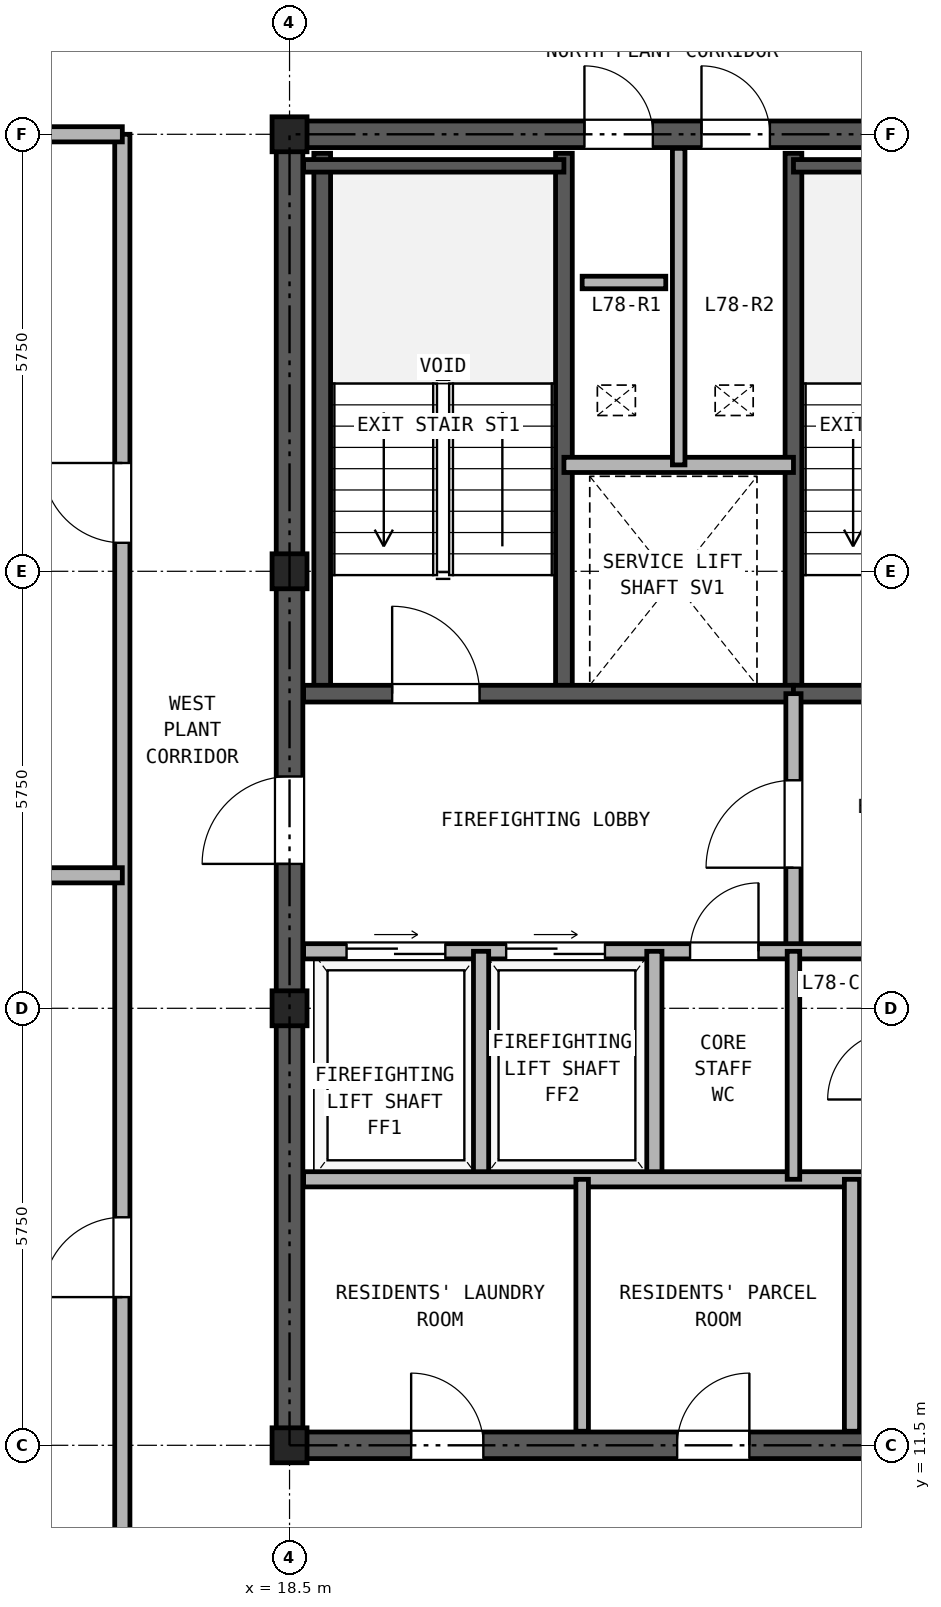
"""IFC4 building model, lengths in metres.
Left out: names, types, materials, properties, quantities, classifications, styles, units other than length and angle.
Written with IfcOpenShell. Run it as: python <this file> out.ifc"""

import sys

from ifc_helpers import new_model, si_unit, direction, frame, frame_2d, origin, origin_2d, place, context, subcontext, project, spatial, rectangle, hollow_rectangle, extrude, source, transform, mapped, element, fill, save


model = new_model("IFC4")
c1 = context("Model", 3, precision=1e-05, world=origin(), true_north=direction((0.0, 1.0)))
c2 = subcontext(c1, "Body", "Model", "MODEL_VIEW")
j1 = project(units=[si_unit("LENGTHUNIT", "METRE"), si_unit("PLANEANGLEUNIT", "RADIAN")], contexts=[c1])
p1 = place(None, origin())
s1 = spatial("IfcSite", under=j1, at=p1, CompositionType="ELEMENT")
p2 = place(p1, origin())
s2 = spatial("IfcBuilding", under=s1, at=p2, CompositionType="ELEMENT")
p3 = place(p2, frame((0.0, 0.0, 271.3)))
s3 = spatial("IfcBuildingStorey", under=s2, at=p3, CompositionType="ELEMENT", Elevation=271.3)
m1 = source(origin(), c2, "Body", "SweptSolid", [
    extrude(hollow_rectangle(XDim=0.46, YDim=0.46, WallThickness=0.025, at=origin_2d()), origin(), (0.0, 0.0, 1.0), 3.38),
])
for number, where, z_axis, x_axis in (
    (1, (18.5, 11.5, 0.0), (0.0, 0.0, 1.0), (1.0, 0.0, 0.0)),
    (2, (18.5, 17.25, 0.0), (0.0, 0.0, 1.0), (1.0, 0.0, 0.0)),
    (3, (18.5, 23.0, 0.0), (0.0, 0.0, 1.0), (1.0, 0.0, 0.0)),
    (4, (18.5, 28.75, 0.0), (0.0, 0.0, 1.0), (1.0, 0.0, 0.0)),
):
    element("IfcColumn", number, at=place(p3, frame(where, z_axis=z_axis, x_axis=x_axis)), inside=s3, PredefinedType="COLUMN", context=c2, shape_type="MappedRepresentation", body=[
        mapped(m1, transform((0.0, 0.0, 0.0), x_axis=(1.0, 0.0, 0.0), y_axis=(0.0, 1.0, 0.0), z_axis=(0.0, 0.0, 1.0), scale=1.0)),
    ])
p4 = place(p3, frame((18.325, 11.5, 0.0), z_axis=(0.0, 0.0, 1.0), x_axis=(1.0, 0.0, 0.0)))
e5 = element("IfcWall", 5, at=p4, inside=s3, PredefinedType="SHEAR", context=c2, shape_type="SweptSolid", body=[
    extrude(rectangle(XDim=10.35, YDim=0.35, at=frame_2d((5.175, 0.0))), origin(), (0.0, 0.0, 1.0), 3.38),
])
p5 = place(p4, frame((1.775, 0.0, 0.0)))
e6 = element("IfcOpeningElement", 6, at=p5, cuts=e5, PredefinedType="OPENING", context=c2, shape_type="SweptSolid", body=[
    extrude(rectangle(XDim=0.95, YDim=2.15, at=frame_2d((0.475, 1.075))), frame((0.0, 0.185, 0.0), z_axis=(0.0, -1.0, 0.0), x_axis=(1.0, 0.0, 0.0)), (0.0, 0.0, 1.0), 0.37),
])
p6 = place(p4, frame((5.275, 0.0, 0.0)))
e7 = element("IfcOpeningElement", 7, at=p6, cuts=e5, PredefinedType="OPENING", context=c2, shape_type="SweptSolid", body=[
    extrude(rectangle(XDim=0.95, YDim=2.15, at=frame_2d((0.475, 1.075))), frame((0.0, 0.185, 0.0), z_axis=(0.0, -1.0, 0.0), x_axis=(1.0, 0.0, 0.0)), (0.0, 0.0, 1.0), 0.37),
])
p7 = place(p3, frame((18.325, 28.75, 0.0), z_axis=(0.0, 0.0, 1.0), x_axis=(1.0, 0.0, 0.0)))
e8 = element("IfcWall", 8, at=p7, inside=s3, PredefinedType="SHEAR", context=c2, shape_type="SweptSolid", body=[
    extrude(rectangle(XDim=10.35, YDim=0.35, at=frame_2d((5.175, 0.0))), origin(), (0.0, 0.0, 1.0), 3.38),
])
p8 = place(p7, frame((4.055, 0.0, 0.0)))
e9 = element("IfcOpeningElement", 9, at=p8, cuts=e8, PredefinedType="OPENING", context=c2, shape_type="SweptSolid", body=[
    extrude(rectangle(XDim=0.9, YDim=2.05, at=frame_2d((0.45, 1.025))), frame((0.0, 0.185, 0.0), z_axis=(0.0, -1.0, 0.0), x_axis=(1.0, 0.0, 0.0)), (0.0, 0.0, 1.0), 0.37),
])
p9 = place(p7, frame((5.595, 0.0, 0.0)))
e10 = element("IfcOpeningElement", 10, at=p9, cuts=e8, PredefinedType="OPENING", context=c2, shape_type="SweptSolid", body=[
    extrude(rectangle(XDim=0.9, YDim=2.05, at=frame_2d((0.45, 1.025))), frame((0.0, 0.185, 0.0), z_axis=(0.0, -1.0, 0.0), x_axis=(1.0, 0.0, 0.0)), (0.0, 0.0, 1.0), 0.37),
])
p10 = place(p3, frame((18.5, 11.675, 0.0), z_axis=(0.0, 0.0, 1.0), x_axis=(0.0, 1.0, 0.0)))
e11 = element("IfcWall", 11, at=p10, inside=s3, PredefinedType="SHEAR", context=c2, shape_type="SweptSolid", body=[
    extrude(rectangle(XDim=16.9, YDim=0.35, at=frame_2d((8.45, 0.0))), origin(), (0.0, 0.0, 1.0), 3.38),
])
p11 = place(p10, frame((7.475, 0.0, 0.0)))
e12 = element("IfcOpeningElement", 12, at=p11, cuts=e11, PredefinedType="OPENING", context=c2, shape_type="SweptSolid", body=[
    extrude(rectangle(XDim=1.15, YDim=2.2, at=frame_2d((0.575, 1.1))), frame((0.0, 0.185, 0.0), z_axis=(0.0, -1.0, 0.0), x_axis=(1.0, 0.0, 0.0)), (0.0, 0.0, 1.0), 0.37),
])
for number, where, z_axis, x_axis in (
    (13, (18.93, 21.39, 0.0), (0.0, 0.0, 1.0), (0.0, 1.0, 0.0)),
    (14, (22.11, 21.39, 0.0), (0.0, 0.0, 1.0), (0.0, 1.0, 0.0)),
    (15, (25.13, 21.39, 0.0), (0.0, 0.0, 1.0), (0.0, 1.0, 0.0)),
):
    element("IfcWall", number, at=place(p3, frame(where, z_axis=z_axis, x_axis=x_axis)), inside=s3, PredefinedType="SOLIDWALL", context=c2, shape_type="SweptSolid", body=[
        extrude(rectangle(XDim=7.11, YDim=0.22, at=frame_2d((3.555, 0.0))), origin(), (0.0, 0.0, 1.0), 3.38),
    ])
p12 = place(p3, frame((18.685, 28.335, 0.0), z_axis=(0.0, 0.0, 1.0), x_axis=(1.0, 0.0, 0.0)))
e16 = element("IfcWall", 16, at=p12, inside=s3, PredefinedType="PARTITIONING", context=c2, shape_type="SweptSolid", body=[
    extrude(rectangle(XDim=3.425, YDim=0.165, at=frame_2d((1.712, 0.0))), origin(), (0.0, 0.0, 1.0), 3.38),
])
p13 = place(p3, frame((25.13, 28.335, 0.0), z_axis=(0.0, 0.0, 1.0), x_axis=(1.0, 0.0, 0.0)))
e17 = element("IfcWall", 17, at=p13, inside=s3, PredefinedType="PARTITIONING", context=c2, shape_type="SweptSolid", body=[
    extrude(rectangle(XDim=3.185, YDim=0.165, at=frame_2d((1.593, 0.0))), origin(), (0.0, 0.0, 1.0), 3.38),
])
p14 = place(p3, frame((18.685, 21.39, 0.0), z_axis=(0.0, 0.0, 1.0), x_axis=(1.0, 0.0, 0.0)))
e18 = element("IfcWall", 18, at=p14, inside=s3, PredefinedType="SOLIDWALL", context=c2, shape_type="SweptSolid", body=[
    extrude(rectangle(XDim=6.445, YDim=0.22, at=frame_2d((3.222, 0.0))), origin(), (0.0, 0.0, 1.0), 3.38),
])
p15 = place(p14, frame((1.165, 0.0, 0.0)))
e19 = element("IfcOpeningElement", 19, at=p15, cuts=e18, PredefinedType="OPENING", context=c2, shape_type="SweptSolid", body=[
    extrude(rectangle(XDim=1.15, YDim=2.2, at=frame_2d((0.575, 1.1))), frame((0.0, 0.12, 0.0), z_axis=(0.0, -1.0, 0.0), x_axis=(1.0, 0.0, 0.0)), (0.0, 0.0, 1.0), 0.24),
])
p16 = place(p3, frame((25.13, 21.39, 0.0), z_axis=(0.0, 0.0, 1.0), x_axis=(1.0, 0.0, 0.0)))
e20 = element("IfcWall", 20, at=p16, inside=s3, PredefinedType="SOLIDWALL", context=c2, shape_type="SweptSolid", body=[
    extrude(rectangle(XDim=3.185, YDim=0.22, at=frame_2d((1.593, 0.0))), origin(), (0.0, 0.0, 1.0), 3.38),
])
p17 = place(p16, frame((0.92, 0.0, 0.0)))
e21 = element("IfcOpeningElement", 21, at=p17, cuts=e20, PredefinedType="OPENING", context=c2, shape_type="SweptSolid", body=[
    extrude(rectangle(XDim=1.15, YDim=2.2, at=frame_2d((0.575, 1.1))), frame((0.0, 0.12, 0.0), z_axis=(0.0, -1.0, 0.0), x_axis=(1.0, 0.0, 0.0)), (0.0, 0.0, 1.0), 0.24),
])
p18 = place(p3, frame((22.11, 24.4, 0.0), z_axis=(0.0, 0.0, 1.0), x_axis=(1.0, 0.0, 0.0)))
e22 = element("IfcWall", 22, at=p18, inside=s3, PredefinedType="PARTITIONING", context=c2, shape_type="SweptSolid", body=[
    extrude(rectangle(XDim=3.02, YDim=0.2, at=frame_2d((1.51, 0.0))), origin(), (0.0, 0.0, 1.0), 3.38),
])
p19 = place(p3, frame((23.62, 24.4, 0.0), z_axis=(0.0, 0.0, 1.0), x_axis=(0.0, 1.0, 0.0)))
e23 = element("IfcWall", 23, at=p19, inside=s3, PredefinedType="PARTITIONING", context=c2, shape_type="SweptSolid", body=[
    extrude(rectangle(XDim=4.165, YDim=0.165, at=frame_2d((2.083, 0.0))), origin(), (0.0, 0.0, 1.0), 3.38),
])
p20 = place(p3, frame((25.13, 18.0, 0.0), z_axis=(0.0, 0.0, 1.0), x_axis=(0.0, 1.0, 0.0)))
e24 = element("IfcWall", 24, at=p20, inside=s3, PredefinedType="PARTITIONING", context=c2, shape_type="SweptSolid", body=[
    extrude(rectangle(XDim=3.39, YDim=0.2, at=frame_2d((1.695, 0.0))), origin(), (0.0, 0.0, 1.0), 3.38),
])
p21 = place(p20, frame((1.1, 0.0, 0.0)))
e25 = element("IfcOpeningElement", 25, at=p21, cuts=e24, PredefinedType="OPENING", context=c2, shape_type="SweptSolid", body=[
    extrude(rectangle(XDim=1.15, YDim=2.2, at=frame_2d((0.575, 1.1))), frame((0.0, 0.11, 0.0), z_axis=(0.0, -1.0, 0.0), x_axis=(1.0, 0.0, 0.0)), (0.0, 0.0, 1.0), 0.22),
])
p22 = place(p3, frame((18.685, 18.0, 0.0), z_axis=(0.0, 0.0, 1.0), x_axis=(1.0, 0.0, 0.0)))
e26 = element("IfcWall", 26, at=p22, inside=s3, PredefinedType="PARTITIONING", context=c2, shape_type="SweptSolid", body=[
    extrude(rectangle(XDim=9.63, YDim=0.2, at=frame_2d((4.815, 0.0))), origin(), (0.0, 0.0, 1.0), 3.38),
])
p23 = place(p22, frame((0.565, 0.0, 0.0)))
e27 = element("IfcOpeningElement", 27, at=p23, cuts=e26, PredefinedType="OPENING", context=c2, shape_type="SweptSolid", body=[
    extrude(rectangle(XDim=1.3, YDim=2.3, at=frame_2d((0.65, 1.15))), frame((0.0, 0.11, 0.0), z_axis=(0.0, -1.0, 0.0), x_axis=(1.0, 0.0, 0.0)), (0.0, 0.0, 1.0), 0.22),
])
p24 = place(p22, frame((2.665, 0.0, 0.0)))
e28 = element("IfcOpeningElement", 28, at=p24, cuts=e26, PredefinedType="OPENING", context=c2, shape_type="SweptSolid", body=[
    extrude(rectangle(XDim=1.3, YDim=2.3, at=frame_2d((0.65, 1.15))), frame((0.0, 0.11, 0.0), z_axis=(0.0, -1.0, 0.0), x_axis=(1.0, 0.0, 0.0)), (0.0, 0.0, 1.0), 0.22),
])
p25 = place(p22, frame((5.085, 0.0, 0.0)))
e29 = element("IfcOpeningElement", 29, at=p25, cuts=e26, PredefinedType="OPENING", context=c2, shape_type="SweptSolid", body=[
    extrude(rectangle(XDim=0.9, YDim=2.05, at=frame_2d((0.45, 1.025))), frame((0.0, 0.11, 0.0), z_axis=(0.0, -1.0, 0.0), x_axis=(1.0, 0.0, 0.0)), (0.0, 0.0, 1.0), 0.22),
])
p26 = place(p22, frame((8.215, 0.0, 0.0)))
e30 = element("IfcOpeningElement", 30, at=p26, cuts=e26, PredefinedType="OPENING", context=c2, shape_type="SweptSolid", body=[
    extrude(rectangle(XDim=0.9, YDim=2.05, at=frame_2d((0.45, 1.025))), frame((0.0, 0.11, 0.0), z_axis=(0.0, -1.0, 0.0), x_axis=(1.0, 0.0, 0.0)), (0.0, 0.0, 1.0), 0.22),
])
for number, where, z_axis, x_axis in (
    (31, (21.02, 15.0, 0.0), (0.0, 0.0, 1.0), (0.0, 1.0, 0.0)),
    (32, (23.3, 15.0, 0.0), (0.0, 0.0, 1.0), (0.0, 1.0, 0.0)),
):
    element("IfcWall", number, at=place(p3, frame(where, z_axis=z_axis, x_axis=x_axis)), inside=s3, PredefinedType="PARTITIONING", context=c2, shape_type="SweptSolid", body=[
        extrude(rectangle(XDim=3.0, YDim=0.2, at=frame_2d((1.5, 0.0))), origin(), (0.0, 0.0, 1.0), 3.38),
    ])
p27 = place(p3, frame((18.685, 15.0, 0.0), z_axis=(0.0, 0.0, 1.0), x_axis=(1.0, 0.0, 0.0)))
e33 = element("IfcWall", 33, at=p27, inside=s3, PredefinedType="PARTITIONING", context=c2, shape_type="SweptSolid", body=[
    extrude(rectangle(XDim=9.63, YDim=0.2, at=frame_2d((4.815, 0.0))), origin(), (0.0, 0.0, 1.0), 3.38),
])
p28 = place(p3, frame((25.13, 15.0, 0.0), z_axis=(0.0, 0.0, 1.0), x_axis=(0.0, 1.0, 0.0)))
e34 = element("IfcWall", 34, at=p28, inside=s3, PredefinedType="PARTITIONING", context=c2, shape_type="SweptSolid", body=[
    extrude(rectangle(XDim=3.0, YDim=0.165, at=frame_2d((1.5, 0.0))), origin(), (0.0, 0.0, 1.0), 3.38),
])
p29 = place(p3, frame((22.35, 11.685, 0.0), z_axis=(0.0, 0.0, 1.0), x_axis=(0.0, 1.0, 0.0)))
e35 = element("IfcWall", 35, at=p29, inside=s3, PredefinedType="PARTITIONING", context=c2, shape_type="SweptSolid", body=[
    extrude(rectangle(XDim=3.315, YDim=0.165, at=frame_2d((1.657, 0.0))), origin(), (0.0, 0.0, 1.0), 3.38),
])
p30 = place(p3, frame((25.9, 11.685, 0.0), z_axis=(0.0, 0.0, 1.0), x_axis=(0.0, 1.0, 0.0)))
e36 = element("IfcWall", 36, at=p30, inside=s3, PredefinedType="PARTITIONING", context=c2, shape_type="SweptSolid", body=[
    extrude(rectangle(XDim=3.315, YDim=0.2, at=frame_2d((1.657, 0.0))), origin(), (0.0, 0.0, 1.0), 3.38),
])
p31 = place(p3, frame((16.3, 8.9, 0.0), z_axis=(0.0, 0.0, 1.0), x_axis=(0.0, 1.0, 0.0)))
e37 = element("IfcWall", 37, at=p31, inside=s3, PredefinedType="PARTITIONING", context=c2, shape_type="SweptSolid", body=[
    extrude(rectangle(XDim=19.85, YDim=0.2, at=frame_2d((9.925, 0.0))), origin(), (0.0, 0.0, 1.0), 3.38),
])
p32 = place(p31, frame((4.55, 0.0, 0.0)))
e38 = element("IfcOpeningElement", 38, at=p32, cuts=e37, PredefinedType="OPENING", context=c2, shape_type="SweptSolid", body=[
    extrude(rectangle(XDim=1.05, YDim=2.15, at=frame_2d((0.525, 1.075))), frame((0.0, 0.11, 0.0), z_axis=(0.0, -1.0, 0.0), x_axis=(1.0, 0.0, 0.0)), (0.0, 0.0, 1.0), 0.22),
])
p33 = place(p31, frame((14.475, 0.0, 0.0)))
e39 = element("IfcOpeningElement", 39, at=p33, cuts=e37, PredefinedType="OPENING", context=c2, shape_type="SweptSolid", body=[
    extrude(rectangle(XDim=1.05, YDim=2.15, at=frame_2d((0.525, 1.075))), frame((0.0, 0.11, 0.0), z_axis=(0.0, -1.0, 0.0), x_axis=(1.0, 0.0, 0.0)), (0.0, 0.0, 1.0), 0.22),
])
p34 = place(p3, frame((5.45, 28.75, 0.0), z_axis=(0.0, 0.0, 1.0), x_axis=(1.0, 0.0, 0.0)))
e40 = element("IfcWall", 40, at=p34, inside=s3, PredefinedType="PARTITIONING", context=c2, shape_type="SweptSolid", body=[
    extrude(rectangle(XDim=10.85, YDim=0.2, at=frame_2d((5.425, 0.0))), origin(), (0.0, 0.0, 1.0), 2.905),
])
p35 = place(p3, frame((5.45, 19.0, 0.0), z_axis=(0.0, 0.0, 1.0), x_axis=(1.0, 0.0, 0.0)))
e41 = element("IfcWall", 41, at=p35, inside=s3, PredefinedType="PARTITIONING", context=c2, shape_type="SweptSolid", body=[
    extrude(rectangle(XDim=10.85, YDim=0.2, at=frame_2d((5.425, 0.0))), origin(), (0.0, 0.0, 1.0), 3.38),
])
p36 = place(p3, frame((22.35, 26.8, 0.0), z_axis=(0.0, 0.0, 1.0), x_axis=(1.0, 0.0, 0.0)))
e42 = element("IfcWall", 42, at=p36, inside=s3, PredefinedType="PARTITIONING", context=c2, shape_type="SweptSolid", body=[
    extrude(rectangle(XDim=1.1, YDim=0.165, at=frame_2d((0.55, 0.0))), origin(), (0.0, 0.0, 1.0), 3.38),
])
p37 = place(p15, frame((1.15, 0.0, 0.0), z_axis=(0.0, 0.0, 1.0), x_axis=(-1.0, 0.0, 0.0)))
e43 = element("IfcDoor", 43, at=p37, inside=s3, OperationType="SINGLE_SWING_LEFT", PredefinedType="DOOR", context=c2, shape_type="SweptSolid", body=[
    extrude(rectangle(XDim=1.15, YDim=2.2, at=frame_2d((0.575, 1.1))), frame((0.0, 0.025, 0.0), z_axis=(0.0, -1.0, 0.0), x_axis=(1.0, 0.0, 0.0)), (0.0, 0.0, 1.0), 0.05),
])
fill(e19, e43)
p38 = place(p21, origin())
e44 = element("IfcDoor", 44, at=p38, inside=s3, OperationType="SINGLE_SWING_LEFT", PredefinedType="DOOR", context=c2, shape_type="SweptSolid", body=[
    extrude(rectangle(XDim=1.15, YDim=2.2, at=frame_2d((0.575, 1.1))), frame((0.0, 0.025, 0.0), z_axis=(0.0, -1.0, 0.0), x_axis=(1.0, 0.0, 0.0)), (0.0, 0.0, 1.0), 0.05),
])
fill(e25, e44)
p39 = place(p23, origin())
e45 = element("IfcDoor", 45, at=p39, inside=s3, OperationType="DOUBLE_DOOR_SLIDING", PredefinedType="DOOR", context=c2, shape_type="SweptSolid", body=[
    extrude(rectangle(XDim=1.3, YDim=2.3, at=frame_2d((0.65, 1.15))), frame((0.0, 0.025, 0.0), z_axis=(0.0, -1.0, 0.0), x_axis=(1.0, 0.0, 0.0)), (0.0, 0.0, 1.0), 0.05),
])
fill(e27, e45)
p40 = place(p24, origin())
e46 = element("IfcDoor", 46, at=p40, inside=s3, OperationType="DOUBLE_DOOR_SLIDING", PredefinedType="DOOR", context=c2, shape_type="SweptSolid", body=[
    extrude(rectangle(XDim=1.3, YDim=2.3, at=frame_2d((0.65, 1.15))), frame((0.0, 0.025, 0.0), z_axis=(0.0, -1.0, 0.0), x_axis=(1.0, 0.0, 0.0)), (0.0, 0.0, 1.0), 0.05),
])
fill(e28, e46)
p41 = place(p25, frame((0.9, 0.0, 0.0), z_axis=(0.0, 0.0, 1.0), x_axis=(-1.0, 0.0, 0.0)))
e47 = element("IfcDoor", 47, at=p41, inside=s3, OperationType="SINGLE_SWING_RIGHT", PredefinedType="DOOR", context=c2, shape_type="SweptSolid", body=[
    extrude(rectangle(XDim=0.9, YDim=2.05, at=frame_2d((0.45, 1.025))), frame((0.0, 0.025, 0.0), z_axis=(0.0, -1.0, 0.0), x_axis=(1.0, 0.0, 0.0)), (0.0, 0.0, 1.0), 0.05),
])
fill(e29, e47)
p42 = place(p11, frame((1.15, 0.0, 0.0), z_axis=(0.0, 0.0, 1.0), x_axis=(-1.0, 0.0, 0.0)))
e48 = element("IfcDoor", 48, at=p42, inside=s3, OperationType="SINGLE_SWING_LEFT", PredefinedType="DOOR", context=c2, shape_type="SweptSolid", body=[
    extrude(rectangle(XDim=1.15, YDim=2.2, at=frame_2d((0.575, 1.1))), frame((0.0, 0.025, 0.0), z_axis=(0.0, -1.0, 0.0), x_axis=(1.0, 0.0, 0.0)), (0.0, 0.0, 1.0), 0.05),
])
fill(e12, e48)
p43 = place(p8, origin())
e49 = element("IfcDoor", 49, at=p43, inside=s3, OperationType="SINGLE_SWING_LEFT", PredefinedType="DOOR", context=c2, shape_type="SweptSolid", body=[
    extrude(rectangle(XDim=0.9, YDim=2.05, at=frame_2d((0.45, 1.025))), frame((0.0, 0.025, 0.0), z_axis=(0.0, -1.0, 0.0), x_axis=(1.0, 0.0, 0.0)), (0.0, 0.0, 1.0), 0.05),
])
fill(e9, e49)
p44 = place(p9, origin())
e50 = element("IfcDoor", 50, at=p44, inside=s3, OperationType="SINGLE_SWING_LEFT", PredefinedType="DOOR", context=c2, shape_type="SweptSolid", body=[
    extrude(rectangle(XDim=0.9, YDim=2.05, at=frame_2d((0.45, 1.025))), frame((0.0, 0.025, 0.0), z_axis=(0.0, -1.0, 0.0), x_axis=(1.0, 0.0, 0.0)), (0.0, 0.0, 1.0), 0.05),
])
fill(e10, e50)
p45 = place(p5, frame((0.95, 0.0, 0.0), z_axis=(0.0, 0.0, 1.0), x_axis=(-1.0, 0.0, 0.0)))
e51 = element("IfcDoor", 51, at=p45, inside=s3, OperationType="SINGLE_SWING_LEFT", PredefinedType="DOOR", context=c2, shape_type="SweptSolid", body=[
    extrude(rectangle(XDim=0.95, YDim=2.15, at=frame_2d((0.475, 1.075))), frame((0.0, 0.025, 0.0), z_axis=(0.0, -1.0, 0.0), x_axis=(1.0, 0.0, 0.0)), (0.0, 0.0, 1.0), 0.05),
])
fill(e6, e51)
p46 = place(p6, frame((0.95, 0.0, 0.0), z_axis=(0.0, 0.0, 1.0), x_axis=(-1.0, 0.0, 0.0)))
e52 = element("IfcDoor", 52, at=p46, inside=s3, OperationType="SINGLE_SWING_RIGHT", PredefinedType="DOOR", context=c2, shape_type="SweptSolid", body=[
    extrude(rectangle(XDim=0.95, YDim=2.15, at=frame_2d((0.475, 1.075))), frame((0.0, 0.025, 0.0), z_axis=(0.0, -1.0, 0.0), x_axis=(1.0, 0.0, 0.0)), (0.0, 0.0, 1.0), 0.05),
])
fill(e7, e52)
p47 = place(p32, frame((1.05, 0.0, 0.0), z_axis=(0.0, 0.0, 1.0), x_axis=(-1.0, 0.0, 0.0)))
e53 = element("IfcDoor", 53, at=p47, inside=s3, OperationType="SINGLE_SWING_LEFT", PredefinedType="DOOR", context=c2, shape_type="SweptSolid", body=[
    extrude(rectangle(XDim=1.05, YDim=2.15, at=frame_2d((0.525, 1.075))), frame((0.0, 0.025, 0.0), z_axis=(0.0, -1.0, 0.0), x_axis=(1.0, 0.0, 0.0)), (0.0, 0.0, 1.0), 0.05),
])
fill(e38, e53)
p48 = place(p33, frame((1.05, 0.0, 0.0), z_axis=(0.0, 0.0, 1.0), x_axis=(-1.0, 0.0, 0.0)))
e54 = element("IfcDoor", 54, at=p48, inside=s3, OperationType="SINGLE_SWING_RIGHT", PredefinedType="DOOR", context=c2, shape_type="SweptSolid", body=[
    extrude(rectangle(XDim=1.05, YDim=2.15, at=frame_2d((0.525, 1.075))), frame((0.0, 0.025, 0.0), z_axis=(0.0, -1.0, 0.0), x_axis=(1.0, 0.0, 0.0)), (0.0, 0.0, 1.0), 0.05),
])
fill(e39, e54)
save(model, sys.argv[1])
